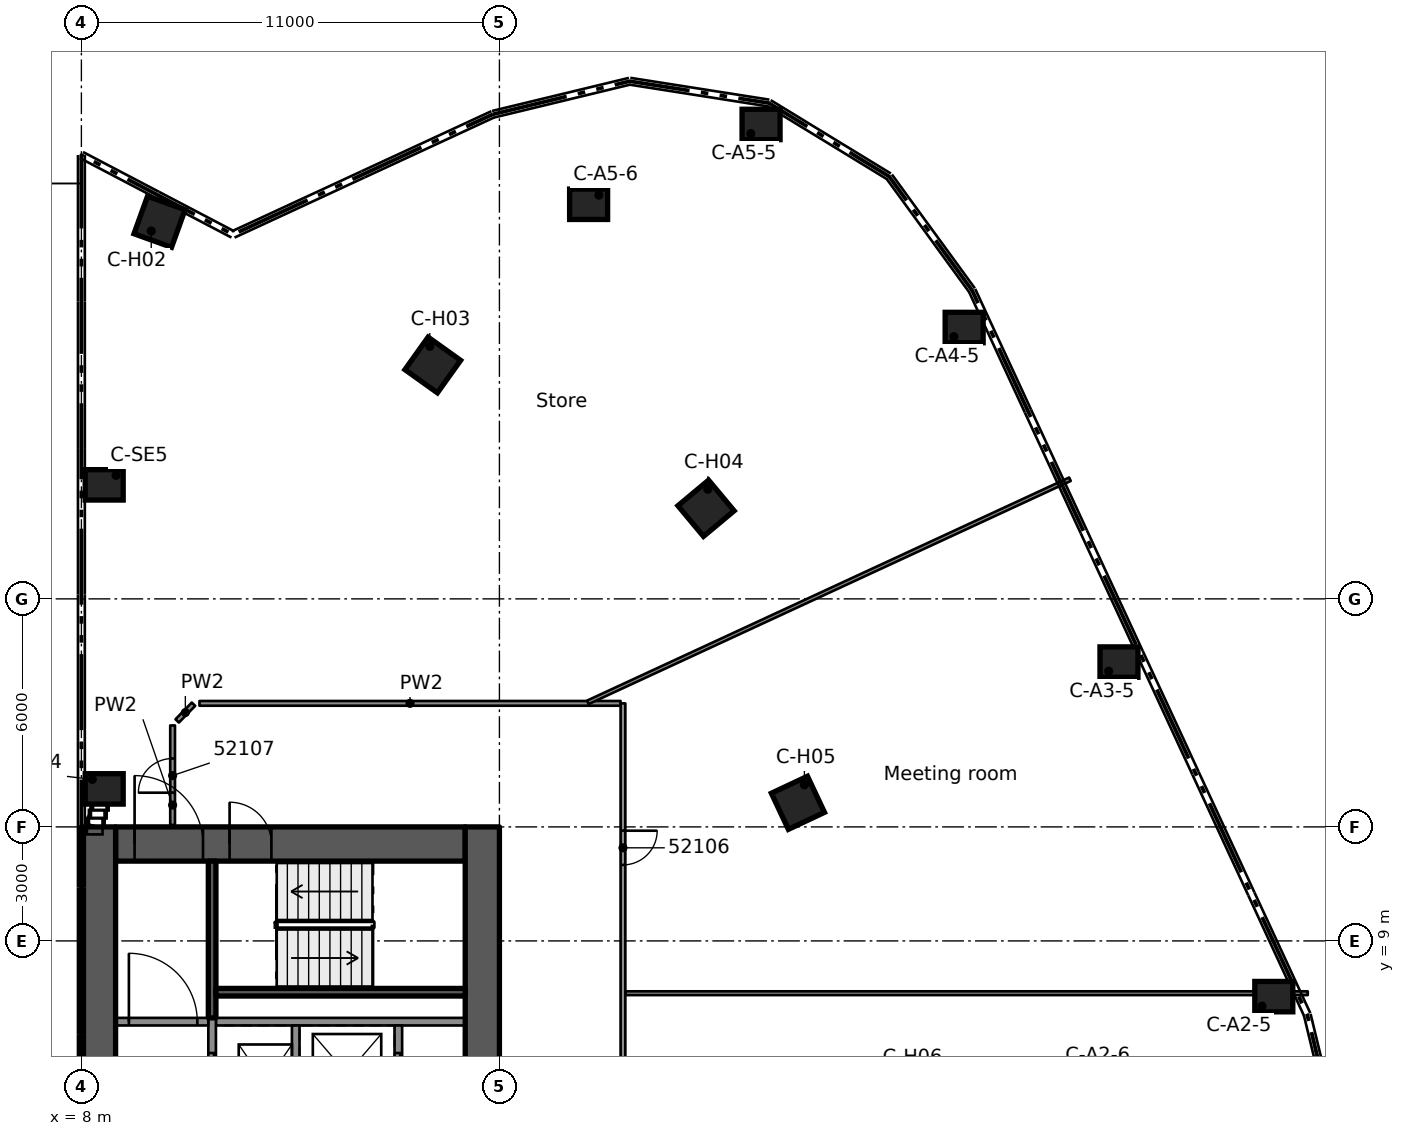
"""IFC4 building model, lengths in metres.
Left out: names, types, materials, properties, quantities, classifications, styles, units other than length and angle.
Written with IfcOpenShell. Run it as: python <this file> out.ifc"""

import sys

from ifc_helpers import new_model, si_unit, direction, frame, frame_2d, origin, origin_2d, place, context, subcontext, project, spatial, rectangle, extrude, element, fill, save


model = new_model("IFC4")
c1 = context("Model", 3, precision=1e-05, world=origin(), true_north=direction((0.0, 1.0)))
c2 = subcontext(c1, "Body", "Model", "MODEL_VIEW")
j1 = project(units=[si_unit("LENGTHUNIT", "METRE"), si_unit("PLANEANGLEUNIT", "RADIAN")], contexts=[c1])
p1 = place(None, origin())
s1 = spatial("IfcSite", under=j1, at=p1, CompositionType="ELEMENT")
p2 = place(p1, origin())
s2 = spatial("IfcBuilding", under=s1, at=p2, CompositionType="ELEMENT")
p3 = place(p2, frame((0.0, 0.0, 257.0)))
s3 = spatial("IfcBuildingStorey", under=s2, at=p3, CompositionType="ELEMENT", Elevation=257.0)
p4 = place(p3, frame((8.9, 11.55, 0.0), z_axis=(0.0, 0.0, 1.0), x_axis=(1.0, 0.0, 0.0)))
e1 = element("IfcWall", 1, at=p4, inside=s3, PredefinedType="SHEAR", context=c2, shape_type="SweptSolid", body=[
    extrude(rectangle(XDim=9.2, YDim=0.9, at=frame_2d((4.6, 0.0))), origin(), (0.0, 0.0, 1.0), 3.5),
])
p5 = place(p4, frame((0.5, 0.0, 0.0)))
e2 = element("IfcOpeningElement", 2, at=p5, cuts=e1, PredefinedType="OPENING", context=c2, shape_type="SweptSolid", body=[
    extrude(rectangle(XDim=1.8, YDim=2.1, at=frame_2d((0.9, 1.05))), frame((0.0, 0.46, 0.0), z_axis=(0.0, -1.0, 0.0), x_axis=(1.0, 0.0, 0.0)), (0.0, 0.0, 1.0), 0.92),
])
p6 = place(p4, frame((3.0, 0.0, 0.0)))
e3 = element("IfcOpeningElement", 3, at=p6, cuts=e1, PredefinedType="OPENING", context=c2, shape_type="SweptSolid", body=[
    extrude(rectangle(XDim=1.1, YDim=2.1, at=frame_2d((0.55, 1.05))), frame((0.0, 0.46, 0.0), z_axis=(0.0, -1.0, 0.0), x_axis=(1.0, 0.0, 0.0)), (0.0, 0.0, 1.0), 0.92),
])
p7 = place(p3, frame((8.45, -12.0, 0.0), z_axis=(0.0, 0.0, 1.0), x_axis=(0.0, 1.0, 0.0)))
e4 = element("IfcWall", 4, at=p7, inside=s3, PredefinedType="SHEAR", context=c2, shape_type="SweptSolid", body=[
    extrude(rectangle(XDim=24.0, YDim=0.9, at=frame_2d((12.0, 0.0))), origin(), (0.0, 0.0, 1.0), 3.5),
])
p8 = place(p3, frame((18.55, -12.0, 0.0), z_axis=(0.0, 0.0, 1.0), x_axis=(0.0, 1.0, 0.0)))
e5 = element("IfcWall", 5, at=p8, inside=s3, PredefinedType="SHEAR", context=c2, shape_type="SweptSolid", body=[
    extrude(rectangle(XDim=24.0, YDim=0.9, at=frame_2d((12.0, 0.0))), origin(), (0.0, 0.0, 1.0), 3.5),
])
p9 = place(p8, frame((12.1, 0.0, 0.0)))
e6 = element("IfcOpeningElement", 6, at=p9, cuts=e5, PredefinedType="OPENING", context=c2, shape_type="SweptSolid", body=[
    extrude(rectangle(XDim=1.8, YDim=2.1, at=frame_2d((0.9, 1.05))), frame((0.0, 0.46, 0.0), z_axis=(0.0, -1.0, 0.0), x_axis=(1.0, 0.0, 0.0)), (0.0, 0.0, 1.0), 0.92),
])
for number, where, z_axis, x_axis in (
    (7, (39.377, 7.534, 0.0), (0.0, 0.0, 1.0), (1.0, 0.0, 0.0)),
    (8, (35.303, 16.337, 0.0), (0.0, 0.0, 1.0), (1.0, 0.0, 0.0)),
    (9, (31.229, 25.14, 0.0), (0.0, 0.0, 1.0), (1.0, 0.0, 0.0)),
    (10, (25.885, 30.483, 0.0), (0.0, 0.0, 1.0), (1.0, 0.0, 0.0)),
    (11, (21.347, 28.383, 0.0), (0.0, 0.0, 1.0), (1.0, 0.0, 0.0)),
):
    element("IfcColumn", number, at=place(p3, frame(where, z_axis=z_axis, x_axis=x_axis)), inside=s3, PredefinedType="COLUMN", context=c2, shape_type="SweptSolid", body=[
        extrude(rectangle(XDim=1.0, YDim=0.8, at=origin_2d()), origin(), (0.0, 0.0, 1.0), 3.5),
    ])
for number, where, z_axis, x_axis in (
    (12, (10.056, 27.923, 0.0), (0.0, 0.0, 1.0), (0.339, 0.941, 0.0)),
    (13, (17.246, 24.154, 0.0), (0.0, 0.0, 1.0), (0.581, 0.814, 0.0)),
    (14, (24.437, 20.384, 0.0), (0.0, 0.0, 1.0), (0.768, 0.641, 0.0)),
    (15, (26.855, 12.634, 0.0), (0.0, 0.0, 1.0), (0.905, 0.426, 0.0)),
):
    element("IfcColumn", number, at=place(p3, frame(where, z_axis=z_axis, x_axis=x_axis)), inside=s3, PredefinedType="COLUMN", context=c2, shape_type="SweptSolid", body=[
        extrude(rectangle(XDim=1.05, YDim=1.05, at=origin_2d()), origin(), (0.0, 0.0, 1.0), 3.5),
    ])
for number, where, z_axis, x_axis in (
    (16, (8.6, 13.0, 0.0), (0.0, 0.0, 1.0), (1.0, 0.0, 0.0)),
    (17, (8.6, 21.0, 0.0), (0.0, 0.0, 1.0), (1.0, 0.0, 0.0)),
):
    element("IfcColumn", number, at=place(p3, frame(where, z_axis=z_axis, x_axis=x_axis)), inside=s3, PredefinedType="COLUMN", context=c2, shape_type="SweptSolid", body=[
        extrude(rectangle(XDim=1.0, YDim=0.8, at=origin_2d()), origin(), (0.0, 0.0, 1.0), 3.5),
    ])
p10 = place(p2, frame((0.0, 0.0, 271.0)))
s4 = spatial("IfcBuildingStorey", under=s2, at=p10, CompositionType="ELEMENT", Elevation=271.0)
p11 = place(p10, frame((8.6, 31.179, -21.5), z_axis=(0.0, 0.0, 1.0), x_axis=(1.0, 0.0, 0.0)))
e18 = element("IfcColumn", 18, at=p11, inside=s4, PredefinedType="COLUMN", context=c2, shape_type="SweptSolid", body=[
    extrude(rectangle(XDim=1.2, YDim=1.2, at=origin_2d()), origin(), (0.0, 0.0, 1.0), 25.5),
])
p12 = place(p3, frame((11.54, 6.875, 0.0), z_axis=(0.0, 0.0, 1.0), x_axis=(1.0, 0.0, 0.0)))
e19 = element("IfcWall", 19, at=p12, inside=s3, PredefinedType="SOLIDWALL", context=c2, shape_type="SweptSolid", body=[
    extrude(rectangle(XDim=6.56, YDim=0.2, at=frame_2d((3.28, 0.0))), origin(), (0.0, 0.0, 1.0), 3.09),
])
p13 = place(p3, frame((11.44, 6.975, 0.0), z_axis=(0.0, 0.0, 1.0), x_axis=(0.0, -1.0, 0.0)))
e20 = element("IfcWall", 20, at=p13, inside=s3, PredefinedType="SOLIDWALL", context=c2, shape_type="SweptSolid", body=[
    extrude(rectangle(XDim=13.95, YDim=0.2, at=frame_2d((6.975, 0.0))), origin(), (0.0, 0.0, 1.0), 3.09),
])
p14 = place(p13, frame((0.925, 0.0, 0.0)))
e21 = element("IfcOpeningElement", 21, at=p14, cuts=e20, PredefinedType="OPENING", context=c2, shape_type="SweptSolid", body=[
    extrude(rectangle(XDim=1.1, YDim=2.1, at=frame_2d((0.55, 1.05))), frame((0.0, 0.11, 0.0), z_axis=(0.0, -1.0, 0.0), x_axis=(1.0, 0.0, 0.0)), (0.0, 0.0, 1.0), 0.22),
])
p15 = place(p13, frame((3.675, 0.0, 0.0)))
e22 = element("IfcOpeningElement", 22, at=p15, cuts=e20, PredefinedType="OPENING", context=c2, shape_type="SweptSolid", body=[
    extrude(rectangle(XDim=1.1, YDim=2.1, at=frame_2d((0.55, 1.05))), frame((0.0, 0.11, 0.0), z_axis=(0.0, -1.0, 0.0), x_axis=(1.0, 0.0, 0.0)), (0.0, 0.0, 1.0), 0.22),
])
p16 = place(p13, frame((11.925, 0.0, 0.0)))
e23 = element("IfcOpeningElement", 23, at=p16, cuts=e20, PredefinedType="OPENING", context=c2, shape_type="SweptSolid", body=[
    extrude(rectangle(XDim=1.1, YDim=2.1, at=frame_2d((0.55, 1.05))), frame((0.0, 0.11, 0.0), z_axis=(0.0, -1.0, 0.0), x_axis=(1.0, 0.0, 0.0)), (0.0, 0.0, 1.0), 0.22),
])
p17 = place(p13, frame((6.575, 0.0, 0.0)))
e24 = element("IfcOpeningElement", 24, at=p17, cuts=e20, PredefinedType="OPENING", context=c2, shape_type="SweptSolid", body=[
    extrude(rectangle(XDim=0.8, YDim=2.1, at=frame_2d((0.4, 1.05))), frame((0.0, 0.11, 0.0), z_axis=(0.0, -1.0, 0.0), x_axis=(1.0, 0.0, 0.0)), (0.0, 0.0, 1.0), 0.22),
])
p18 = place(p13, frame((9.325, 0.0, 0.0)))
e25 = element("IfcOpeningElement", 25, at=p18, cuts=e20, PredefinedType="OPENING", context=c2, shape_type="SweptSolid", body=[
    extrude(rectangle(XDim=0.8, YDim=2.1, at=frame_2d((0.4, 1.05))), frame((0.0, 0.11, 0.0), z_axis=(0.0, -1.0, 0.0), x_axis=(1.0, 0.0, 0.0)), (0.0, 0.0, 1.0), 0.22),
])
p19 = place(p3, frame((13.64, 6.775, 0.0), z_axis=(0.0, 0.0, 1.0), x_axis=(0.0, -1.0, 0.0)))
e26 = element("IfcWall", 26, at=p19, inside=s3, PredefinedType="SOLIDWALL", context=c2, shape_type="SweptSolid", body=[
    extrude(rectangle(XDim=2.55, YDim=0.2, at=frame_2d((1.275, 0.0))), origin(), (0.0, 0.0, 1.0), 3.09),
])
p20 = place(p3, frame((16.34, 6.775, 0.0), z_axis=(0.0, 0.0, 1.0), x_axis=(0.0, -1.0, 0.0)))
e27 = element("IfcWall", 27, at=p20, inside=s3, PredefinedType="SOLIDWALL", context=c2, shape_type="SweptSolid", body=[
    extrude(rectangle(XDim=2.75, YDim=0.2, at=frame_2d((1.375, 0.0))), origin(), (0.0, 0.0, 1.0), 3.09),
])
p21 = place(p20, frame((0.725, 0.0, 0.0)))
e28 = element("IfcOpeningElement", 28, at=p21, cuts=e27, PredefinedType="OPENING", context=c2, shape_type="SweptSolid", body=[
    extrude(rectangle(XDim=1.1, YDim=2.1, at=frame_2d((0.55, 1.05))), frame((0.0, 0.11, 0.0), z_axis=(0.0, -1.0, 0.0), x_axis=(1.0, 0.0, 0.0)), (0.0, 0.0, 1.0), 0.22),
])
p22 = place(p3, frame((11.44, 11.1, 0.0), z_axis=(0.0, 0.0, 1.0), x_axis=(0.0, -1.0, 0.0)))
e29 = element("IfcWall", 29, at=p22, inside=s3, PredefinedType="SOLIDWALL", context=c2, shape_type="SweptSolid", body=[
    extrude(rectangle(XDim=4.125, YDim=0.2, at=frame_2d((2.062, 0.0))), origin(), (0.0, 0.0, 1.0), 3.09),
])
p23 = place(p3, frame((11.54, 7.65, 0.0), z_axis=(0.0, 0.0, 1.0), x_axis=(1.0, 0.0, 0.0)))
e30 = element("IfcWall", 30, at=p23, inside=s3, PredefinedType="SOLIDWALL", context=c2, shape_type="SweptSolid", body=[
    extrude(rectangle(XDim=6.56, YDim=0.2, at=frame_2d((3.28, 0.0))), origin(), (0.0, 0.0, 1.0), 3.09),
])
p24 = place(p3, frame((8.9, 6.875, 0.0), z_axis=(0.0, 0.0, 1.0), x_axis=(1.0, 0.0, 0.0)))
e31 = element("IfcWall", 31, at=p24, inside=s3, PredefinedType="PARTITIONING", context=c2, shape_type="SweptSolid", body=[
    extrude(rectangle(XDim=2.44, YDim=0.2, at=frame_2d((1.22, 0.0))), origin(), (0.0, 0.0, 1.0), 3.09),
])
p25 = place(p24, frame((0.35, 0.0, 0.0)))
e32 = element("IfcOpeningElement", 32, at=p25, cuts=e31, PredefinedType="OPENING", context=c2, shape_type="SweptSolid", body=[
    extrude(rectangle(XDim=1.8, YDim=2.1, at=frame_2d((0.9, 1.05))), frame((0.0, 0.11, 0.0), z_axis=(0.0, -1.0, 0.0), x_axis=(1.0, 0.0, 0.0)), (0.0, 0.0, 1.0), 0.22),
])
p26 = place(p3, frame((22.314, 7.624, 0.0), z_axis=(0.0, 0.0, 1.0), x_axis=(1.0, 0.0, 0.0)))
e33 = element("IfcWall", 33, at=p26, inside=s3, PredefinedType="PARTITIONING", context=c2, shape_type="SweptSolid", body=[
    extrude(rectangle(XDim=17.957, YDim=0.1, at=frame_2d((8.979, 0.0))), origin(), (0.0, 0.0, 1.0), 3.08),
])
p27 = place(p3, frame((11.107, 15.251, 0.0), z_axis=(0.0, 0.0, 1.0), x_axis=(1.0, 0.0, 0.0)))
e34 = element("IfcWall", 34, at=p27, inside=s3, PredefinedType="PARTITIONING", context=c2, shape_type="SweptSolid", body=[
    extrude(rectangle(XDim=11.081, YDim=0.125, at=frame_2d((5.541, 0.0))), origin(), (0.0, 0.0, 1.0), 3.08),
])
p28 = place(p3, frame((21.326, 15.277, 0.0), z_axis=(0.0, 0.0, 1.0), x_axis=(0.907542351842, 0.419960569117, 0.0)))
e35 = element("IfcWall", 35, at=p28, inside=s3, PredefinedType="PARTITIONING", context=c2, shape_type="SweptSolid", body=[
    extrude(rectangle(XDim=13.979, YDim=0.1, at=frame_2d((6.99, 0.0))), origin(), (0.0, 0.0, 1.0), 3.08),
])
p29 = place(p3, frame((10.521, 14.789, 0.0), z_axis=(0.0, 0.0, 1.0), x_axis=(0.698110320765, 0.715990209459, 0.0)))
e36 = element("IfcWall", 36, at=p29, inside=s3, PredefinedType="PARTITIONING", context=c2, shape_type="SweptSolid", body=[
    extrude(rectangle(XDim=0.615, YDim=0.125, at=frame_2d((0.307, 0.0))), origin(), (0.0, 0.0, 1.0), 3.08),
])
p30 = place(p3, frame((22.251, 15.25, 0.0), z_axis=(0.0, 0.0, 1.0), x_axis=(0.0, -1.0, 0.0)))
e37 = element("IfcWall", 37, at=p30, inside=s3, PredefinedType="PARTITIONING", context=c2, shape_type="SweptSolid", body=[
    extrude(rectangle(XDim=30.5, YDim=0.125, at=frame_2d((15.25, 0.0))), origin(), (0.0, 0.0, 1.0), 3.08),
])
p31 = place(p30, frame((27.38, 0.0, 0.0)))
e38 = element("IfcOpeningElement", 38, at=p31, cuts=e37, PredefinedType="OPENING", context=c2, shape_type="SweptSolid", body=[
    extrude(rectangle(XDim=1.8, YDim=2.1, at=frame_2d((0.9, 1.05))), frame((0.0, 0.073, 0.0), z_axis=(0.0, -1.0, 0.0), x_axis=(1.0, 0.0, 0.0)), (0.0, 0.0, 1.0), 0.145),
])
p32 = place(p30, frame((12.976, 0.0, 0.0)))
e39 = element("IfcOpeningElement", 39, at=p32, cuts=e37, PredefinedType="OPENING", context=c2, shape_type="SweptSolid", body=[
    extrude(rectangle(XDim=1.8, YDim=2.1, at=frame_2d((0.9, 1.05))), frame((0.0, 0.073, 0.0), z_axis=(0.0, -1.0, 0.0), x_axis=(1.0, 0.0, 0.0)), (0.0, 0.0, 1.0), 0.145),
])
p33 = place(p30, frame((3.35, 0.0, 0.0)))
e40 = element("IfcOpeningElement", 40, at=p33, cuts=e37, PredefinedType="OPENING", context=c2, shape_type="SweptSolid", body=[
    extrude(rectangle(XDim=0.9, YDim=2.1, at=frame_2d((0.45, 1.05))), frame((0.0, 0.073, 0.0), z_axis=(0.0, -1.0, 0.0), x_axis=(1.0, 0.0, 0.0)), (0.0, 0.0, 1.0), 0.145),
])
p34 = place(p30, frame((22.88, 0.0, 0.0)))
e41 = element("IfcOpeningElement", 41, at=p34, cuts=e37, PredefinedType="OPENING", context=c2, shape_type="SweptSolid", body=[
    extrude(rectangle(XDim=0.9, YDim=2.1, at=frame_2d((0.45, 1.05))), frame((0.0, 0.073, 0.0), z_axis=(0.0, -1.0, 0.0), x_axis=(1.0, 0.0, 0.0)), (0.0, 0.0, 1.0), 0.145),
])
p35 = place(p3, frame((10.4, 12.05, 0.0), z_axis=(0.0, 0.0, 1.0), x_axis=(0.0, 1.0, 0.0)))
e42 = element("IfcWall", 42, at=p35, inside=s3, PredefinedType="PARTITIONING", context=c2, shape_type="SweptSolid", body=[
    extrude(rectangle(XDim=2.62, YDim=0.125, at=frame_2d((1.31, 0.0))), origin(), (0.0, 0.0, 1.0), 3.08),
])
p36 = place(p35, frame((0.85, 0.0, 0.0)))
e43 = element("IfcOpeningElement", 43, at=p36, cuts=e42, PredefinedType="OPENING", context=c2, shape_type="SweptSolid", body=[
    extrude(rectangle(XDim=0.9, YDim=2.1, at=frame_2d((0.45, 1.05))), frame((0.0, 0.073, 0.0), z_axis=(0.0, -1.0, 0.0), x_axis=(1.0, 0.0, 0.0)), (0.0, 0.0, 1.0), 0.145),
])
p37 = place(p14, origin())
e44 = element("IfcDoor", 44, at=p37, inside=s3, OperationType="DOUBLE_DOOR_SLIDING", PredefinedType="DOOR", context=c2, shape_type="SweptSolid", body=[
    extrude(rectangle(XDim=1.1, YDim=2.1, at=frame_2d((0.55, 1.05))), frame((0.0, 0.025, 0.0), z_axis=(0.0, -1.0, 0.0), x_axis=(1.0, 0.0, 0.0)), (0.0, 0.0, 1.0), 0.05),
])
fill(e21, e44)
p38 = place(p21, origin())
e45 = element("IfcDoor", 45, at=p38, inside=s3, OperationType="DOUBLE_DOOR_SLIDING", PredefinedType="DOOR", context=c2, shape_type="SweptSolid", body=[
    extrude(rectangle(XDim=1.1, YDim=2.1, at=frame_2d((0.55, 1.05))), frame((0.0, 0.025, 0.0), z_axis=(0.0, -1.0, 0.0), x_axis=(1.0, 0.0, 0.0)), (0.0, 0.0, 1.0), 0.05),
])
fill(e28, e45)
p39 = place(p25, origin())
e46 = element("IfcDoor", 46, at=p39, inside=s3, OperationType="DOUBLE_DOOR_DOUBLE_SWING", PredefinedType="DOOR", context=c2, shape_type="SweptSolid", body=[
    extrude(rectangle(XDim=1.8, YDim=2.1, at=frame_2d((0.9, 1.05))), frame((0.0, 0.025, 0.0), z_axis=(0.0, -1.0, 0.0), x_axis=(1.0, 0.0, 0.0)), (0.0, 0.0, 1.0), 0.05),
])
fill(e32, e46)
p40 = place(p5, origin())
e47 = element("IfcDoor", 47, at=p40, inside=s3, OperationType="SINGLE_SWING_LEFT", PredefinedType="DOOR", context=c2, shape_type="SweptSolid", body=[
    extrude(rectangle(XDim=1.8, YDim=2.1, at=frame_2d((0.9, 1.05))), frame((0.0, 0.025, 0.0), z_axis=(0.0, -1.0, 0.0), x_axis=(1.0, 0.0, 0.0)), (0.0, 0.0, 1.0), 0.05),
])
fill(e2, e47)
p41 = place(p6, origin())
e48 = element("IfcDoor", 48, at=p41, inside=s3, OperationType="SINGLE_SWING_LEFT", PredefinedType="DOOR", context=c2, shape_type="SweptSolid", body=[
    extrude(rectangle(XDim=1.1, YDim=2.1, at=frame_2d((0.55, 1.05))), frame((0.0, 0.025, 0.0), z_axis=(0.0, -1.0, 0.0), x_axis=(1.0, 0.0, 0.0)), (0.0, 0.0, 1.0), 0.05),
])
fill(e3, e48)
p42 = place(p33, origin())
e49 = element("IfcDoor", 49, at=p42, inside=s3, OperationType="SINGLE_SWING_LEFT", PredefinedType="DOOR", context=c2, shape_type="SweptSolid", body=[
    extrude(rectangle(XDim=0.9, YDim=2.1, at=frame_2d((0.45, 1.05))), frame((0.0, 0.025, 0.0), z_axis=(0.0, -1.0, 0.0), x_axis=(1.0, 0.0, 0.0)), (0.0, 0.0, 1.0), 0.05),
])
fill(e40, e49)
p43 = place(p36, origin())
e50 = element("IfcDoor", 50, at=p43, inside=s3, OperationType="SINGLE_SWING_LEFT", PredefinedType="DOOR", context=c2, shape_type="SweptSolid", body=[
    extrude(rectangle(XDim=0.9, YDim=2.1, at=frame_2d((0.45, 1.05))), frame((0.0, 0.025, 0.0), z_axis=(0.0, -1.0, 0.0), x_axis=(1.0, 0.0, 0.0)), (0.0, 0.0, 1.0), 0.05),
])
fill(e43, e50)
save(model, sys.argv[1])
